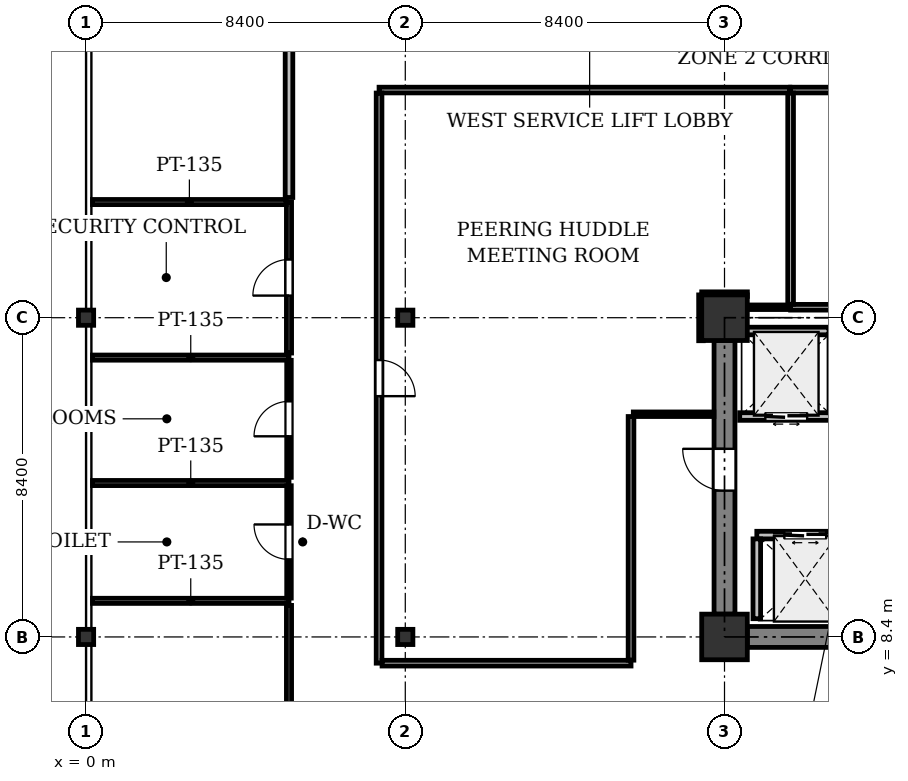
"""IFC4 building model, lengths in metres.
Left out: names, types, materials, properties, quantities, classifications, styles, units other than length and angle.
Written with IfcOpenShell. Run it as: python <this file> out.ifc"""

import sys

from ifc_helpers import new_model, si_unit, direction, frame, frame_2d, origin, origin_2d, place, context, subcontext, project, spatial, rectangle, i_section, extrude, element, fill, save


model = new_model("IFC4")
c1 = context("Model", 3, precision=1e-05, world=origin(), true_north=direction((0.0, 1.0)))
c2 = subcontext(c1, "Body", "Model", "MODEL_VIEW")
j1 = project(units=[si_unit("LENGTHUNIT", "METRE"), si_unit("PLANEANGLEUNIT", "RADIAN")], contexts=[c1])
p1 = place(None, origin())
s1 = spatial("IfcSite", under=j1, at=p1, CompositionType="ELEMENT")
p2 = place(p1, origin())
s2 = spatial("IfcBuilding", under=s1, at=p2, CompositionType="ELEMENT")
p3 = place(p2, frame((0.0, 0.0, 141.8)))
s3 = spatial("IfcBuildingStorey", under=s2, at=p3, CompositionType="ELEMENT", Elevation=141.8)
for number, where, z_axis, x_axis in (
    (1, (0.0, 8.4, 0.0), (0.0, 0.0, 1.0), (1.0, 0.0, 0.0)),
    (2, (0.0, 16.8, 0.0), (0.0, 0.0, 1.0), (1.0, 0.0, 0.0)),
    (3, (8.4, 8.4, 0.0), (0.0, 0.0, 1.0), (1.0, 0.0, 0.0)),
    (4, (8.4, 16.8, 0.0), (0.0, 0.0, 1.0), (1.0, 0.0, 0.0)),
):
    element("IfcColumn", number, at=place(p3, frame(where, z_axis=z_axis, x_axis=x_axis)), inside=s3, PredefinedType="COLUMN", context=c2, shape_type="SweptSolid", body=[
        extrude(i_section(OverallWidth=0.4, OverallDepth=0.4, WebThickness=0.025, FlangeThickness=0.04, at=origin_2d()), origin(), (0.0, 0.0, 1.0), 4.1),
    ])
for number, where, z_axis, x_axis in (
    (5, (16.8, 8.4, 0.0), (0.0, 0.0, 1.0), (1.0, 0.0, 0.0)),
    (6, (16.8, 16.8, 0.0), (0.0, 0.0, 1.0), (1.0, 0.0, 0.0)),
):
    element("IfcColumn", number, at=place(p3, frame(where, z_axis=z_axis, x_axis=x_axis)), inside=s3, PredefinedType="COLUMN", context=c2, shape_type="SweptSolid", body=[
        extrude(rectangle(XDim=1.2, YDim=1.2, at=origin_2d()), origin(), (0.0, 0.0, 1.0), 4.1),
    ])
p4 = place(p3, frame((17.4, 8.4, 0.0), z_axis=(0.0, 0.0, 1.0), x_axis=(1.0, 0.0, 0.0)))
e7 = element("IfcWall", 7, at=p4, inside=s3, PredefinedType="SHEAR", context=c2, shape_type="SweptSolid", body=[
    extrude(rectangle(XDim=7.2, YDim=0.55, at=frame_2d((3.6, 0.0))), origin(), (0.0, 0.0, 1.0), 3.825),
])
p5 = place(p3, frame((16.8, 9.0, 0.0), z_axis=(0.0, 0.0, 1.0), x_axis=(0.0, 1.0, 0.0)))
e8 = element("IfcWall", 8, at=p5, inside=s3, PredefinedType="SHEAR", context=c2, shape_type="SweptSolid", body=[
    extrude(rectangle(XDim=7.2, YDim=0.55, at=frame_2d((3.6, 0.0))), origin(), (0.0, 0.0, 1.0), 3.825),
])
p6 = place(p5, frame((3.25, 0.0, 0.0)))
e9 = element("IfcOpeningElement", 9, at=p6, cuts=e8, PredefinedType="OPENING", context=c2, shape_type="SweptSolid", body=[
    extrude(rectangle(XDim=1.1, YDim=2.15, at=frame_2d((0.55, 1.075))), frame((0.0, 0.285, 0.0), z_axis=(0.0, -1.0, 0.0), x_axis=(1.0, 0.0, 0.0)), (0.0, 0.0, 1.0), 0.57),
])
p7 = place(p3, frame((17.65, 11.08, 0.0), z_axis=(0.0, 0.0, 1.0), x_axis=(1.0, 0.0, 0.0)))
e10 = element("IfcWall", 10, at=p7, inside=s3, PredefinedType="PARTITIONING", context=c2, shape_type="SweptSolid", body=[
    extrude(rectangle(XDim=2.55, YDim=0.2, at=frame_2d((1.275, 0.0))), origin(), (0.0, 0.0, 1.0), 3.825),
])
p8 = place(p7, frame((0.725, 0.0, 0.0)))
e11 = element("IfcOpeningElement", 11, at=p8, cuts=e10, PredefinedType="OPENING", context=c2, shape_type="SweptSolid", body=[
    extrude(rectangle(XDim=1.1, YDim=2.2, at=frame_2d((0.55, 1.1))), frame((0.0, 0.11, 0.0), z_axis=(0.0, -1.0, 0.0), x_axis=(1.0, 0.0, 0.0)), (0.0, 0.0, 1.0), 0.22),
])
p9 = place(p3, frame((17.65, 8.88, 0.0), z_axis=(0.0, 0.0, 1.0), x_axis=(0.0, 1.0, 0.0)))
e12 = element("IfcWall", 12, at=p9, inside=s3, PredefinedType="PARTITIONING", context=c2, shape_type="SweptSolid", body=[
    extrude(rectangle(XDim=2.1, YDim=0.2, at=frame_2d((1.05, 0.0))), origin(), (0.0, 0.0, 1.0), 3.825),
])
p10 = place(p3, frame((17.2, 14.2, 0.0), z_axis=(0.0, 0.0, 1.0), x_axis=(1.0, 0.0, 0.0)))
e13 = element("IfcWall", 13, at=p10, inside=s3, PredefinedType="PARTITIONING", context=c2, shape_type="SweptSolid", body=[
    extrude(rectangle(XDim=2.45, YDim=0.2, at=frame_2d((1.225, 0.0))), origin(), (0.0, 0.0, 1.0), 3.825),
])
p11 = place(p10, frame((0.675, 0.0, 0.0)))
e14 = element("IfcOpeningElement", 14, at=p11, cuts=e13, PredefinedType="OPENING", context=c2, shape_type="SweptSolid", body=[
    extrude(rectangle(XDim=1.1, YDim=2.2, at=frame_2d((0.55, 1.1))), frame((0.0, 0.11, 0.0), z_axis=(0.0, -1.0, 0.0), x_axis=(1.0, 0.0, 0.0)), (0.0, 0.0, 1.0), 0.22),
])
p12 = place(p3, frame((17.3, 16.45, 0.0), z_axis=(0.0, 0.0, 1.0), x_axis=(1.0, 0.0, 0.0)))
e15 = element("IfcWall", 15, at=p12, inside=s3, PredefinedType="PARTITIONING", context=c2, shape_type="SweptSolid", body=[
    extrude(rectangle(XDim=2.25, YDim=0.2, at=frame_2d((1.125, 0.0))), origin(), (0.0, 0.0, 1.0), 3.825),
])
for number, where, z_axis, x_axis in (
    (16, (5.34, 12.45, 0.0), (0.0, 0.0, 1.0), (-1.0, 0.0, 0.0)),
    (17, (0.169, 9.35, 0.0), (0.0, 0.0, 1.0), (1.0, 0.0, 0.0)),
):
    element("IfcWall", number, at=place(p3, frame(where, z_axis=z_axis, x_axis=x_axis)), inside=s3, PredefinedType="PARTITIONING", context=c2, shape_type="SweptSolid", body=[
        extrude(rectangle(XDim=5.171, YDim=0.135, at=frame_2d((2.585, 0.0))), origin(), (0.0, 0.0, 1.0), 3.469),
    ])
p13 = place(p3, frame((5.34, 9.421, 0.0), z_axis=(0.0, 0.0, 1.0), x_axis=(0.0, 1.0, 0.0)))
e18 = element("IfcWall", 18, at=p13, inside=s3, PredefinedType="PARTITIONING", context=c2, shape_type="SweptSolid", body=[
    extrude(rectangle(XDim=2.957, YDim=0.12, at=frame_2d((1.479, 0.0))), origin(), (0.0, 0.0, 1.0), 3.825),
])
p14 = place(p13, frame((1.019, 0.0, 0.0)))
e19 = element("IfcOpeningElement", 19, at=p14, cuts=e18, PredefinedType="OPENING", context=c2, shape_type="SweptSolid", body=[
    extrude(rectangle(XDim=0.92, YDim=2.1, at=frame_2d((0.46, 1.05))), frame((0.0, 0.07, 0.0), z_axis=(0.0, -1.0, 0.0), x_axis=(1.0, 0.0, 0.0)), (0.0, 0.0, 1.0), 0.14),
])
p15 = place(p3, frame((5.34, 15.75, 0.0), z_axis=(0.0, 0.0, 1.0), x_axis=(-1.0, 0.0, 0.0)))
e20 = element("IfcWall", 20, at=p15, inside=s3, PredefinedType="PARTITIONING", context=c2, shape_type="SweptSolid", body=[
    extrude(rectangle(XDim=5.171, YDim=0.135, at=frame_2d((2.585, 0.0))), origin(), (0.0, 0.0, 1.0), 3.469),
])
p16 = place(p3, frame((5.34, 12.6, 0.0), z_axis=(0.0, 0.0, 1.0), x_axis=(0.0, 1.0, 0.0)))
e21 = element("IfcWall", 21, at=p16, inside=s3, PredefinedType="PARTITIONING", context=c2, shape_type="SweptSolid", body=[
    extrude(rectangle(XDim=3.078, YDim=0.12, at=frame_2d((1.539, 0.0))), origin(), (0.0, 0.0, 1.0), 3.825),
])
p17 = place(p16, frame((1.079, 0.0, 0.0)))
e22 = element("IfcOpeningElement", 22, at=p17, cuts=e21, PredefinedType="OPENING", context=c2, shape_type="SweptSolid", body=[
    extrude(rectangle(XDim=0.92, YDim=2.1, at=frame_2d((0.46, 1.05))), frame((0.0, 0.07, 0.0), z_axis=(0.0, -1.0, 0.0), x_axis=(1.0, 0.0, 0.0)), (0.0, 0.0, 1.0), 0.14),
])
p18 = place(p3, frame((5.34, 15.87, 0.0), z_axis=(0.0, 0.0, 1.0), x_axis=(0.0, 1.0, 0.0)))
e23 = element("IfcWall", 23, at=p18, inside=s3, PredefinedType="PARTITIONING", context=c2, shape_type="SweptSolid", body=[
    extrude(rectangle(XDim=3.973, YDim=0.135, at=frame_2d((1.987, 0.0))), origin(), (0.0, 0.0, 1.0), 3.292),
])
p19 = place(p18, frame((1.512, 0.0, 0.0)))
e24 = element("IfcOpeningElement", 24, at=p19, cuts=e23, PredefinedType="OPENING", context=c2, shape_type="SweptSolid", body=[
    extrude(rectangle(XDim=0.95, YDim=2.15, at=frame_2d((0.475, 1.075))), frame((0.0, 0.077, 0.0), z_axis=(0.0, -1.0, 0.0), x_axis=(1.0, 0.0, 0.0)), (0.0, 0.0, 1.0), 0.155),
])
p20 = place(p3, frame((5.269, 19.843, 0.0), z_axis=(0.0, 0.0, 1.0), x_axis=(-1.0, 0.0, 0.0)))
e25 = element("IfcWall", 25, at=p20, inside=s3, PredefinedType="PARTITIONING", context=c2, shape_type="SweptSolid", body=[
    extrude(rectangle(XDim=5.1, YDim=0.135, at=frame_2d((2.55, 0.0))), origin(), (0.0, 0.0, 1.0), 3.469),
])
p21 = place(p3, frame((18.54, 17.075, 0.0), z_axis=(0.0, 0.0, 1.0), x_axis=(1.0, 0.0, 0.0)))
e26 = element("IfcWall", 26, at=p21, inside=s3, PredefinedType="PARTITIONING", context=c2, shape_type="SweptSolid", body=[
    extrude(rectangle(XDim=6.041, YDim=0.15, at=frame_2d((3.02, 0.0))), origin(), (0.0, 0.0, 1.0), 3.469),
])
p22 = place(p3, frame((27.396, 22.79, 0.0), z_axis=(0.0, 0.0, 1.0), x_axis=(-1.0, 0.0, 0.0)))
e27 = element("IfcWall", 27, at=p22, inside=s3, PredefinedType="PARTITIONING", context=c2, shape_type="SweptSolid", body=[
    extrude(rectangle(XDim=8.857, YDim=0.15, at=frame_2d((4.428, 0.0))), origin(), (0.0, 0.0, 1.0), 3.297),
])
p23 = place(p22, frame((3.953, 0.0, 0.0)))
e28 = element("IfcOpeningElement", 28, at=p23, cuts=e27, PredefinedType="OPENING", context=c2, shape_type="SweptSolid", body=[
    extrude(rectangle(XDim=0.95, YDim=2.15, at=frame_2d((0.475, 1.075))), frame((0.0, 0.085, 0.0), z_axis=(0.0, -1.0, 0.0), x_axis=(1.0, 0.0, 0.0)), (0.0, 0.0, 1.0), 0.17),
])
p24 = place(p3, frame((18.54, 22.711, 0.0), z_axis=(0.0, 0.0, 1.0), x_axis=(0.0, -1.0, 0.0)))
e29 = element("IfcWall", 29, at=p24, inside=s3, PredefinedType="PARTITIONING", context=c2, shape_type="SweptSolid", body=[
    extrude(rectangle(XDim=5.557, YDim=0.15, at=frame_2d((2.778, 0.0))), origin(), (0.0, 0.0, 1.0), 3.825),
])
p25 = place(p3, frame((14.4, 14.26, 0.0), z_axis=(0.0, 0.0, 1.0), x_axis=(1.0, 0.0, 0.0)))
e30 = element("IfcWall", 30, at=p25, inside=s3, PredefinedType="PARTITIONING", context=c2, shape_type="SweptSolid", body=[
    extrude(rectangle(XDim=2.121, YDim=0.12, at=frame_2d((1.061, 0.0))), origin(), (0.0, 0.0, 1.0), 3.825),
])
p26 = place(p3, frame((16.181, 16.194, 0.0), z_axis=(0.0, 0.0, 1.0), x_axis=(-0.000809880277, 0.999999672047, 0.0)))
e31 = element("IfcWall", 31, at=p26, inside=s3, PredefinedType="PARTITIONING", context=c2, shape_type="SweptSolid", body=[
    extrude(rectangle(XDim=1.206, YDim=0.12, at=frame_2d((0.603, 0.0))), origin(), (0.0, 0.0, 1.0), 3.292),
])
p27 = place(p3, frame((16.2, 17.42, 0.0), z_axis=(0.0, 0.0, 1.0), x_axis=(1.0, 0.0, 0.0)))
e32 = element("IfcWall", 32, at=p27, inside=s3, PredefinedType="PARTITIONING", context=c2, shape_type="SweptSolid", body=[
    extrude(rectangle(XDim=1.202, YDim=0.12, at=frame_2d((0.601, 0.0))), origin(), (0.0, 0.0, 1.0), 3.297),
])
p28 = place(p3, frame((17.42, 17.075, 0.0), z_axis=(0.0, 0.0, 1.0), x_axis=(1.0, 0.0, 0.0)))
e33 = element("IfcWall", 33, at=p28, inside=s3, PredefinedType="PARTITIONING", context=c2, shape_type="SweptSolid", body=[
    extrude(rectangle(XDim=1.1, YDim=0.12, at=frame_2d((0.55, 0.0))), origin(), (0.0, 0.0, 1.0), 3.825),
])
p29 = place(p3, frame((18.52, 22.79, 0.0), z_axis=(0.0, 0.0, 1.0), x_axis=(-1.0, 0.0, 0.0)))
e34 = element("IfcWall", 34, at=p29, inside=s3, PredefinedType="PARTITIONING", context=c2, shape_type="SweptSolid", body=[
    extrude(rectangle(XDim=10.81, YDim=0.15, at=frame_2d((5.405, 0.0))), origin(), (0.0, 0.0, 1.0), 3.297),
])
p30 = place(p3, frame((7.71, 22.711, 0.0), z_axis=(0.0, 0.0, 1.0), x_axis=(0.0, -1.0, 0.0)))
e35 = element("IfcWall", 35, at=p30, inside=s3, PredefinedType="PARTITIONING", context=c2, shape_type="SweptSolid", body=[
    extrude(rectangle(XDim=15.001, YDim=0.15, at=frame_2d((7.5, 0.0))), origin(), (0.0, 0.0, 1.0), 3.292),
])
p31 = place(p30, frame((7.025, 0.0, 0.0)))
e36 = element("IfcOpeningElement", 36, at=p31, cuts=e35, PredefinedType="OPENING", context=c2, shape_type="SweptSolid", body=[
    extrude(rectangle(XDim=0.95, YDim=2.15, at=frame_2d((0.475, 1.075))), frame((0.0, 0.085, 0.0), z_axis=(0.0, -1.0, 0.0), x_axis=(1.0, 0.0, 0.0)), (0.0, 0.0, 1.0), 0.17),
])
p32 = place(p3, frame((7.789, 7.71, 0.0), z_axis=(0.0, 0.0, 1.0), x_axis=(1.0, 0.0, 0.0)))
e37 = element("IfcWall", 37, at=p32, inside=s3, PredefinedType="PARTITIONING", context=c2, shape_type="SweptSolid", body=[
    extrude(rectangle(XDim=6.551, YDim=0.15, at=frame_2d((3.275, 0.0))), origin(), (0.0, 0.0, 1.0), 3.297),
])
p33 = place(p3, frame((14.34, 7.789, 0.0), z_axis=(0.0, 0.0, 1.0), x_axis=(0.0, 1.0, 0.0)))
e38 = element("IfcWall", 38, at=p33, inside=s3, PredefinedType="PARTITIONING", context=c2, shape_type="SweptSolid", body=[
    extrude(rectangle(XDim=6.411, YDim=0.15, at=frame_2d((3.206, 0.0))), origin(), (0.0, 0.0, 1.0), 3.292),
])
p34 = place(p3, frame((5.34, 5.4, 0.0), z_axis=(0.0, 0.0, 1.0), x_axis=(0.0, 1.0, 0.0)))
e39 = element("IfcWall", 39, at=p34, inside=s3, PredefinedType="PARTITIONING", context=c2, shape_type="SweptSolid", body=[
    extrude(rectangle(XDim=3.83, YDim=0.135, at=frame_2d((1.915, 0.0))), origin(), (0.0, 0.0, 1.0), 3.292),
])
p35 = place(p3, frame((5.34, 19.963, 0.0), z_axis=(0.0, 0.0, 1.0), x_axis=(1.1713442e-05, 0.999999999931, 0.0)))
e40 = element("IfcWall", 40, at=p35, inside=s3, PredefinedType="PARTITIONING", context=c2, shape_type="SweptSolid", body=[
    extrude(rectangle(XDim=20.843, YDim=0.2, at=frame_2d((10.421, 0.0))), origin(), (0.0, 0.0, 1.0), 3.292),
])
p36 = place(p35, frame((9.921, 0.0, 0.0)))
e41 = element("IfcOpeningElement", 41, at=p36, cuts=e40, PredefinedType="OPENING", context=c2, shape_type="SweptSolid", body=[
    extrude(rectangle(XDim=1.0, YDim=2.15, at=frame_2d((0.5, 1.075))), frame((0.0, 0.11, 0.0), z_axis=(0.0, -1.0, 0.0), x_axis=(1.0, 0.0, 0.0)), (0.0, 0.0, 1.0), 0.22),
])
p37 = place(p6, origin())
e42 = element("IfcDoor", 42, at=p37, inside=s3, OperationType="SINGLE_SWING_RIGHT", PredefinedType="DOOR", context=c2, shape_type="SweptSolid", body=[
    extrude(rectangle(XDim=1.1, YDim=2.15, at=frame_2d((0.55, 1.075))), frame((0.0, 0.025, 0.0), z_axis=(0.0, -1.0, 0.0), x_axis=(1.0, 0.0, 0.0)), (0.0, 0.0, 1.0), 0.05),
])
fill(e9, e42)
p38 = place(p8, origin())
e43 = element("IfcDoor", 43, at=p38, inside=s3, OperationType="DOUBLE_DOOR_SLIDING", PredefinedType="DOOR", context=c2, shape_type="SweptSolid", body=[
    extrude(rectangle(XDim=1.1, YDim=2.2, at=frame_2d((0.55, 1.1))), frame((0.0, 0.025, 0.0), z_axis=(0.0, -1.0, 0.0), x_axis=(1.0, 0.0, 0.0)), (0.0, 0.0, 1.0), 0.05),
])
fill(e11, e43)
p39 = place(p11, origin())
e44 = element("IfcDoor", 44, at=p39, inside=s3, OperationType="DOUBLE_DOOR_SLIDING", PredefinedType="DOOR", context=c2, shape_type="SweptSolid", body=[
    extrude(rectangle(XDim=1.1, YDim=2.2, at=frame_2d((0.55, 1.1))), frame((0.0, 0.025, 0.0), z_axis=(0.0, -1.0, 0.0), x_axis=(1.0, 0.0, 0.0)), (0.0, 0.0, 1.0), 0.05),
])
fill(e14, e44)
p40 = place(p14, origin())
e45 = element("IfcDoor", 45, at=p40, inside=s3, OperationType="SINGLE_SWING_RIGHT", PredefinedType="DOOR", context=c2, shape_type="SweptSolid", body=[
    extrude(rectangle(XDim=0.92, YDim=2.1, at=frame_2d((0.46, 1.05))), frame((0.0, 0.025, 0.0), z_axis=(0.0, -1.0, 0.0), x_axis=(1.0, 0.0, 0.0)), (0.0, 0.0, 1.0), 0.05),
])
fill(e19, e45)
p41 = place(p17, origin())
e46 = element("IfcDoor", 46, at=p41, inside=s3, OperationType="SINGLE_SWING_LEFT", PredefinedType="DOOR", context=c2, shape_type="SweptSolid", body=[
    extrude(rectangle(XDim=0.92, YDim=2.1, at=frame_2d((0.46, 1.05))), frame((0.0, 0.025, 0.0), z_axis=(0.0, -1.0, 0.0), x_axis=(1.0, 0.0, 0.0)), (0.0, 0.0, 1.0), 0.05),
])
fill(e22, e46)
p42 = place(p19, origin())
e47 = element("IfcDoor", 47, at=p42, inside=s3, OperationType="SINGLE_SWING_LEFT", PredefinedType="DOOR", context=c2, shape_type="SweptSolid", body=[
    extrude(rectangle(XDim=0.95, YDim=2.15, at=frame_2d((0.475, 1.075))), frame((0.0, 0.025, 0.0), z_axis=(0.0, -1.0, 0.0), x_axis=(1.0, 0.0, 0.0)), (0.0, 0.0, 1.0), 0.05),
])
fill(e24, e47)
p43 = place(p31, origin())
e48 = element("IfcDoor", 48, at=p43, inside=s3, OperationType="SINGLE_SWING_RIGHT", PredefinedType="DOOR", context=c2, shape_type="SweptSolid", body=[
    extrude(rectangle(XDim=0.95, YDim=2.15, at=frame_2d((0.475, 1.075))), frame((0.0, 0.025, 0.0), z_axis=(0.0, -1.0, 0.0), x_axis=(1.0, 0.0, 0.0)), (0.0, 0.0, 1.0), 0.05),
])
fill(e36, e48)
save(model, sys.argv[1])
